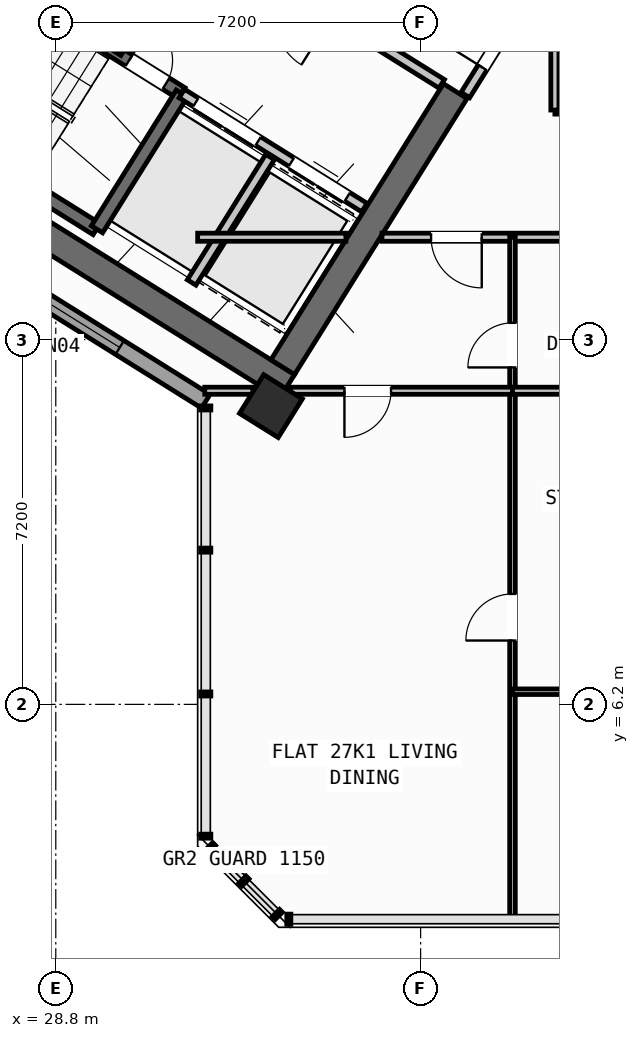
"""IFC4 building model, lengths in metres.
Left out: names, types, materials, properties, quantities, classifications, styles, units other than length and angle.
Written with IfcOpenShell. Run it as: python <this file> out.ifc"""

import sys

from ifc_helpers import new_model, si_unit, direction, frame, frame_2d, origin, origin_2d, place, context, subcontext, project, spatial, rectangle, hollow_rectangle, extrude, source, transform, mapped, element, fill, save


model = new_model("IFC4")
c1 = context("Model", 3, precision=1e-05, world=origin(), true_north=direction((0.0, 1.0)))
c2 = subcontext(c1, "Body", "Model", "MODEL_VIEW")
j1 = project(units=[si_unit("LENGTHUNIT", "METRE"), si_unit("PLANEANGLEUNIT", "RADIAN")], contexts=[c1])
p1 = place(None, origin())
s1 = spatial("IfcSite", under=j1, at=p1, CompositionType="ELEMENT")
p2 = place(p1, origin())
s2 = spatial("IfcBuilding", under=s1, at=p2, CompositionType="ELEMENT")
p3 = place(p2, frame((0.0, 0.0, 108.9)))
s3 = spatial("IfcBuildingStorey", under=s2, at=p3, CompositionType="ELEMENT", Elevation=108.9)
p4 = place(p3, frame((33.366, 12.477, 0.0), z_axis=(0.0, 0.0, 1.0), x_axis=(-0.848047359947, 0.529920442413, 0.0)))
e1 = element("IfcWall", 1, at=p4, inside=s3, PredefinedType="SHEAR", context=c2, shape_type="SweptSolid", body=[
    extrude(rectangle(XDim=13.14, YDim=0.55, at=frame_2d((6.57, 0.0))), origin(), (0.0, 0.0, 1.0), 3.35),
])
p5 = place(p3, frame((36.683, 18.304, 0.0), z_axis=(0.0, 0.0, 1.0), x_axis=(-0.529896466841, -0.848062341122, 0.0)))
e2 = element("IfcWall", 2, at=p5, inside=s3, PredefinedType="SHEAR", context=c2, shape_type="SweptSolid", body=[
    extrude(rectangle(XDim=6.425, YDim=0.55, at=frame_2d((3.212, 0.0))), origin(), (0.0, 0.0, 1.0), 3.35),
])
m1 = source(origin(), c2, "Body", "SweptSolid", [
    extrude(hollow_rectangle(XDim=0.9, YDim=0.9, WallThickness=0.036, at=origin_2d()), origin(), (0.0, 0.0, 1.0), 3.6),
])
p6 = place(p3, frame((33.046, 12.087, 0.0), z_axis=(0.0, 0.0, 1.0), x_axis=(-0.848048096156, 0.529919264233, 0.0)))
e3 = element("IfcColumn", 3, at=p6, inside=s3, PredefinedType="COLUMN", context=c2, shape_type="MappedRepresentation", body=[
    mapped(m1, transform((0.0, 0.0, 0.0), scale=1.0)),
])
p7 = place(p3, frame((31.76, 12.183, 0.0), z_axis=(0.0, 0.0, 1.0), x_axis=(-0.848047074256, 0.529920899612, 0.0)))
e4 = element("IfcWall", 4, at=p7, inside=s3, PredefinedType="STANDARD", context=c2, shape_type="SweptSolid", body=[
    extrude(rectangle(XDim=30.652, YDim=0.32, at=frame_2d((15.326, 0.0))), origin(), (0.0, 0.0, 1.0), 3.35),
])
p8 = place(p7, frame((15.153, 0.0, 0.0)))
e5 = element("IfcOpeningElement", 5, at=p8, cuts=e4, PredefinedType="OPENING", context=c2, shape_type="SweptSolid", body=[
    extrude(rectangle(XDim=1.2, YDim=2.15, at=frame_2d((0.6, 1.075))), frame((0.0, 0.17, 0.0), z_axis=(0.0, -1.0, 0.0), x_axis=(1.0, 0.0, 0.0)), (0.0, 0.0, 1.0), 0.34),
])
p9 = place(p7, frame((2.002, 0.0, 0.8)))
e6 = element("IfcOpeningElement", 6, at=p9, cuts=e4, PredefinedType="OPENING", context=c2, shape_type="SweptSolid", body=[
    extrude(rectangle(XDim=2.1, YDim=1.55, at=frame_2d((1.05, 0.775))), frame((0.0, 0.17, 0.0), z_axis=(0.0, -1.0, 0.0), x_axis=(1.0, 0.0, 0.0)), (0.0, 0.0, 1.0), 0.34),
])
p10 = place(p7, frame((7.206, 0.0, 0.8)))
e7 = element("IfcOpeningElement", 7, at=p10, cuts=e4, PredefinedType="OPENING", context=c2, shape_type="SweptSolid", body=[
    extrude(rectangle(XDim=2.1, YDim=1.55, at=frame_2d((1.05, 0.775))), frame((0.0, 0.17, 0.0), z_axis=(0.0, -1.0, 0.0), x_axis=(1.0, 0.0, 0.0)), (0.0, 0.0, 1.0), 0.34),
])
p11 = place(p7, frame((12.648, 0.0, 1.0)))
e8 = element("IfcOpeningElement", 8, at=p11, cuts=e4, PredefinedType="OPENING", context=c2, shape_type="SweptSolid", body=[
    extrude(rectangle(XDim=0.9, YDim=1.25, at=frame_2d((0.45, 0.625))), frame((0.0, 0.17, 0.0), z_axis=(0.0, -1.0, 0.0), x_axis=(1.0, 0.0, 0.0)), (0.0, 0.0, 1.0), 0.34),
])
p12 = place(p7, frame((19.59, 0.0, 0.95)))
e9 = element("IfcOpeningElement", 9, at=p12, cuts=e4, PredefinedType="OPENING", context=c2, shape_type="SweptSolid", body=[
    extrude(rectangle(XDim=1.2, YDim=1.4, at=frame_2d((0.6, 0.7))), frame((0.0, 0.17, 0.0), z_axis=(0.0, -1.0, 0.0), x_axis=(1.0, 0.0, 0.0)), (0.0, 0.0, 1.0), 0.34),
])
p13 = place(p7, frame((25.966, 0.0, 1.0)))
e10 = element("IfcOpeningElement", 10, at=p13, cuts=e4, PredefinedType="OPENING", context=c2, shape_type="SweptSolid", body=[
    extrude(rectangle(XDim=0.9, YDim=1.25, at=frame_2d((0.45, 0.625))), frame((0.0, 0.17, 0.0), z_axis=(0.0, -1.0, 0.0), x_axis=(1.0, 0.0, 0.0)), (0.0, 0.0, 1.0), 0.34),
])
p14 = place(p7, frame((28.871, 0.0, 1.0)))
e11 = element("IfcOpeningElement", 11, at=p14, cuts=e4, PredefinedType="OPENING", context=c2, shape_type="SweptSolid", body=[
    extrude(rectangle(XDim=0.9, YDim=1.25, at=frame_2d((0.45, 0.625))), frame((0.0, 0.17, 0.0), z_axis=(0.0, -1.0, 0.0), x_axis=(1.0, 0.0, 0.0)), (0.0, 0.0, 1.0), 0.34),
])
p15 = place(p3, frame((29.605, 15.581, 0.0), z_axis=(0.0, 0.0, 1.0), x_axis=(-0.848036911448, 0.529937163087, 0.0)))
e12 = element("IfcWall", 12, at=p15, inside=s3, PredefinedType="SHEAR", context=c2, shape_type="SweptSolid", body=[
    extrude(rectangle(XDim=7.46, YDim=0.26, at=frame_2d((3.73, 0.0))), origin(), (0.0, 0.0, 1.0), 3.35),
])
p16 = place(p3, frame((31.28, 18.261, 0.0), z_axis=(0.0, 0.0, 1.0), x_axis=(-0.848051618787, 0.529913626805, 0.0)))
e13 = element("IfcWall", 13, at=p16, inside=s3, PredefinedType="SHEAR", context=c2, shape_type="SweptSolid", body=[
    extrude(rectangle(XDim=7.46, YDim=0.26, at=frame_2d((3.73, 0.0))), origin(), (0.0, 0.0, 1.0), 3.35),
])
p17 = place(p16, frame((0.36, 0.0, 0.0)))
e14 = element("IfcOpeningElement", 14, at=p17, cuts=e13, PredefinedType="OPENING", context=c2, shape_type="SweptSolid", body=[
    extrude(rectangle(XDim=0.86, YDim=2.05, at=frame_2d((0.43, 1.025))), frame((0.0, 0.14, 0.0), z_axis=(0.0, -1.0, 0.0), x_axis=(1.0, 0.0, 0.0)), (0.0, 0.0, 1.0), 0.28),
])
p18 = place(p3, frame((31.288, 18.256, 0.0), z_axis=(0.0, 0.0, 1.0), x_axis=(-0.529943379326, -0.848033026897, 0.0)))
e15 = element("IfcWall", 15, at=p18, inside=s3, PredefinedType="SHEAR", context=c2, shape_type="SweptSolid", body=[
    extrude(rectangle(XDim=3.16, YDim=0.26, at=frame_2d((1.58, 0.0))), origin(), (0.0, 0.0, 1.0), 3.35),
])
p19 = place(p3, frame((34.891, 16.005, 0.0), z_axis=(0.0, 0.0, 1.0), x_axis=(-0.848062873452, 0.529895614884, 0.0)))
e16 = element("IfcWall", 16, at=p19, inside=s3, PredefinedType="STANDARD", context=c2, shape_type="SweptSolid", body=[
    extrude(rectangle(XDim=4.248, YDim=0.2, at=frame_2d((2.124, 0.0))), origin(), (0.0, 0.0, 1.0), 3.34),
])
p20 = place(p19, frame((0.398, 0.0, 0.0)))
e17 = element("IfcOpeningElement", 17, at=p20, cuts=e16, PredefinedType="OPENING", context=c2, shape_type="SweptSolid", body=[
    extrude(rectangle(XDim=1.3, YDim=2.2, at=frame_2d((0.65, 1.1))), frame((0.0, 0.11, 0.0), z_axis=(0.0, -1.0, 0.0), x_axis=(1.0, 0.0, 0.0)), (0.0, 0.0, 1.0), 0.22),
])
p21 = place(p19, frame((2.473, 0.0, 0.0)))
e18 = element("IfcOpeningElement", 18, at=p21, cuts=e16, PredefinedType="OPENING", context=c2, shape_type="SweptSolid", body=[
    extrude(rectangle(XDim=1.45, YDim=2.25, at=frame_2d((0.725, 1.125))), frame((0.0, 0.11, 0.0), z_axis=(0.0, -1.0, 0.0), x_axis=(1.0, 0.0, 0.0)), (0.0, 0.0, 1.0), 0.22),
])
p22 = place(p3, frame((36.417, 18.447, 0.0), z_axis=(0.0, 0.0, 1.0), x_axis=(-0.848064879198, 0.529892404805, 0.0)))
e19 = element("IfcWall", 19, at=p22, inside=s3, PredefinedType="STANDARD", context=c2, shape_type="SweptSolid", body=[
    extrude(rectangle(XDim=5.768, YDim=0.2, at=frame_2d((2.884, 0.0))), origin(), (0.0, 0.0, 1.0), 3.34),
])
p23 = place(p22, frame((2.548, 0.0, 0.0)))
e20 = element("IfcOpeningElement", 20, at=p23, cuts=e19, PredefinedType="OPENING", context=c2, shape_type="SweptSolid", body=[
    extrude(rectangle(XDim=1.15, YDim=2.1, at=frame_2d((0.575, 1.05))), frame((0.0, 0.11, 0.0), z_axis=(0.0, -1.0, 0.0), x_axis=(1.0, 0.0, 0.0)), (0.0, 0.0, 1.0), 0.22),
])
p24 = place(p3, frame((33.029, 17.003, 0.0), z_axis=(0.0, 0.0, 1.0), x_axis=(-0.529916267533, -0.848049968695, 0.0)))
e21 = element("IfcWall", 21, at=p24, inside=s3, PredefinedType="STANDARD", context=c2, shape_type="SweptSolid", body=[
    extrude(rectangle(XDim=2.92, YDim=0.2, at=frame_2d((1.46, 0.0))), origin(), (0.0, 0.0, 1.0), 3.34),
])
p25 = place(p3, frame((31.525, 21.504, 0.0), z_axis=(0.0, 0.0, 1.0), x_axis=(-0.529907497854, -0.848055448493, 0.0)))
e22 = element("IfcWall", 22, at=p25, inside=s3, PredefinedType="STANDARD", context=c2, shape_type="SweptSolid", body=[
    extrude(rectangle(XDim=2.88, YDim=0.2, at=frame_2d((1.44, 0.0))), origin(), (0.0, 0.0, 1.0), 3.34),
])
p26 = place(p3, frame((38.451, 20.737, 0.0), z_axis=(0.0, 0.0, 1.0), x_axis=(-0.529924799939, -0.848044637038, 0.0)))
e23 = element("IfcWall", 23, at=p26, inside=s3, PredefinedType="STANDARD", context=c2, shape_type="SweptSolid", body=[
    extrude(rectangle(XDim=2.96, YDim=0.2, at=frame_2d((1.48, 0.0))), origin(), (0.0, 0.0, 1.0), 3.34),
])
p27 = place(p26, frame((1.46, 0.0, 0.0)))
e24 = element("IfcOpeningElement", 24, at=p27, cuts=e23, PredefinedType="OPENING", context=c2, shape_type="SweptSolid", body=[
    extrude(rectangle(XDim=0.86, YDim=2.05, at=frame_2d((0.43, 1.025))), frame((0.0, 0.11, 0.0), z_axis=(0.0, -1.0, 0.0), x_axis=(1.0, 0.0, 0.0)), (0.0, 0.0, 1.0), 0.22),
])
p28 = place(p3, frame((31.6, 15.42, 0.0), z_axis=(0.0, 0.0, 1.0), x_axis=(1.0, 0.0, 0.0)))
e25 = element("IfcWall", 25, at=p28, inside=s3, PredefinedType="PARTITIONING", context=c2, shape_type="SweptSolid", body=[
    extrude(rectangle(XDim=2.925, YDim=0.16, at=frame_2d((1.462, 0.0))), origin(), (0.0, 0.0, 1.0), 3.34),
])
p29 = place(p3, frame((35.237, 15.42, 0.0), z_axis=(0.0, 0.0, 1.0), x_axis=(1.0, 0.0, 0.0)))
e26 = element("IfcWall", 26, at=p29, inside=s3, PredefinedType="PARTITIONING", context=c2, shape_type="SweptSolid", body=[
    extrude(rectangle(XDim=15.432, YDim=0.16, at=frame_2d((7.716, 0.0))), origin(), (0.0, 0.0, 1.0), 3.34),
])
p30 = place(p29, frame((0.969, 0.0, 0.0)))
e27 = element("IfcOpeningElement", 27, at=p30, cuts=e26, PredefinedType="OPENING", context=c2, shape_type="SweptSolid", body=[
    extrude(rectangle(XDim=1.0, YDim=2.1, at=frame_2d((0.5, 1.05))), frame((0.0, 0.09, 0.0), z_axis=(0.0, -1.0, 0.0), x_axis=(1.0, 0.0, 0.0)), (0.0, 0.0, 1.0), 0.18),
])
p31 = place(p29, frame((8.799, 0.0, 0.0)))
e28 = element("IfcOpeningElement", 28, at=p31, cuts=e26, PredefinedType="OPENING", context=c2, shape_type="SweptSolid", body=[
    extrude(rectangle(XDim=1.0, YDim=2.1, at=frame_2d((0.5, 1.05))), frame((0.0, 0.09, 0.0), z_axis=(0.0, -1.0, 0.0), x_axis=(1.0, 0.0, 0.0)), (0.0, 0.0, 1.0), 0.18),
])
p32 = place(p3, frame((38.65, 17.93, 0.0), z_axis=(0.0, 0.0, 1.0), x_axis=(1.0, 0.0, 0.0)))
e29 = element("IfcWall", 29, at=p32, inside=s3, PredefinedType="PARTITIONING", context=c2, shape_type="SweptSolid", body=[
    extrude(rectangle(XDim=9.95, YDim=0.16, at=frame_2d((4.975, 0.0))), origin(), (0.0, 0.0, 1.0), 3.34),
])
p33 = place(p32, frame((4.475, 0.0, 0.0)))
e30 = element("IfcOpeningElement", 30, at=p33, cuts=e29, PredefinedType="OPENING", context=c2, shape_type="SweptSolid", body=[
    extrude(rectangle(XDim=1.0, YDim=2.1, at=frame_2d((0.5, 1.05))), frame((0.0, 0.09, 0.0), z_axis=(0.0, -1.0, 0.0), x_axis=(1.0, 0.0, 0.0)), (0.0, 0.0, 1.0), 0.18),
])
p34 = place(p3, frame((38.65, 17.93, 0.0), z_axis=(0.0, 0.0, 1.0), x_axis=(0.0, 1.0, 0.0)))
e31 = element("IfcWall", 31, at=p34, inside=s3, PredefinedType="PARTITIONING", context=c2, shape_type="SweptSolid", body=[
    extrude(rectangle(XDim=2.951, YDim=0.16, at=frame_2d((1.476, 0.0))), origin(), (0.0, 0.0, 1.0), 3.34),
])
p35 = place(p3, frame((37.813, 1.96, 0.0), z_axis=(0.0, 0.0, 1.0), x_axis=(0.0, 1.0, 0.0)))
e32 = element("IfcWall", 32, at=p35, inside=s3, PredefinedType="PARTITIONING", context=c2, shape_type="SweptSolid", body=[
    extrude(rectangle(XDim=13.46, YDim=0.11, at=frame_2d((6.73, 0.0))), origin(), (0.0, 0.0, 1.0), 3.34),
])
p36 = place(p35, frame((5.5, 0.0, 0.0)))
e33 = element("IfcOpeningElement", 33, at=p36, cuts=e32, PredefinedType="OPENING", context=c2, shape_type="SweptSolid", body=[
    extrude(rectangle(XDim=0.92, YDim=2.08, at=frame_2d((0.46, 1.04))), frame((0.0, 0.065, 0.0), z_axis=(0.0, -1.0, 0.0), x_axis=(1.0, 0.0, 0.0)), (0.0, 0.0, 1.0), 0.13),
])
p37 = place(p35, frame((10.89, 0.0, 0.0)))
e34 = element("IfcOpeningElement", 34, at=p37, cuts=e32, PredefinedType="OPENING", context=c2, shape_type="SweptSolid", body=[
    extrude(rectangle(XDim=0.88, YDim=2.08, at=frame_2d((0.44, 1.04))), frame((0.0, 0.065, 0.0), z_axis=(0.0, -1.0, 0.0), x_axis=(1.0, 0.0, 0.0)), (0.0, 0.0, 1.0), 0.13),
])
p38 = place(p3, frame((31.74, 12.39, 0.0), z_axis=(0.0, 0.0, 1.0), x_axis=(1.0, 0.0, 0.0)))
e35 = element("IfcWall", 35, at=p38, inside=s3, PredefinedType="PLUMBINGWALL", context=c2, shape_type="SweptSolid", body=[
    extrude(rectangle(XDim=0.951, YDim=0.14, at=frame_2d((0.475, 0.0))), origin(), (0.0, 0.0, 1.0), 3.34),
])
p39 = place(p3, frame((33.433, 12.39, 0.0), z_axis=(0.0, 0.0, 1.0), x_axis=(1.0, 0.0, 0.0)))
e36 = element("IfcWall", 36, at=p39, inside=s3, PredefinedType="PLUMBINGWALL", context=c2, shape_type="SweptSolid", body=[
    extrude(rectangle(XDim=4.38, YDim=0.14, at=frame_2d((2.19, 0.0))), origin(), (0.0, 0.0, 1.0), 2.525),
])
p40 = place(p39, frame((1.064, 0.0, 0.0)))
e37 = element("IfcOpeningElement", 37, at=p40, cuts=e36, PredefinedType="OPENING", context=c2, shape_type="SweptSolid", body=[
    extrude(rectangle(XDim=0.92, YDim=2.08, at=frame_2d((0.46, 1.04))), frame((0.0, 0.08, 0.0), z_axis=(0.0, -1.0, 0.0), x_axis=(1.0, 0.0, 0.0)), (0.0, 0.0, 1.0), 0.16),
])
p41 = place(p3, frame((37.813, 12.39, 0.0), z_axis=(0.0, 0.0, 1.0), x_axis=(1.0, 0.0, 0.0)))
e38 = element("IfcWall", 38, at=p41, inside=s3, PredefinedType="PLUMBINGWALL", context=c2, shape_type="SweptSolid", body=[
    extrude(rectangle(XDim=4.137, YDim=0.14, at=frame_2d((2.068, 0.0))), origin(), (0.0, 0.0, 1.0), 2.525),
])
p42 = place(p3, frame((37.813, 6.45, 0.0), z_axis=(0.0, 0.0, 1.0), x_axis=(1.0, 0.0, 0.0)))
e39 = element("IfcWall", 39, at=p42, inside=s3, PredefinedType="PARTITIONING", context=c2, shape_type="SweptSolid", body=[
    extrude(rectangle(XDim=4.137, YDim=0.11, at=frame_2d((2.068, 0.0))), origin(), (0.0, 0.0, 1.0), 3.34),
])
p43 = place(p42, frame((1.608, 0.0, 0.0)))
e40 = element("IfcOpeningElement", 40, at=p43, cuts=e39, PredefinedType="OPENING", context=c2, shape_type="SweptSolid", body=[
    extrude(rectangle(XDim=0.92, YDim=2.08, at=frame_2d((0.46, 1.04))), frame((0.0, 0.065, 0.0), z_axis=(0.0, -1.0, 0.0), x_axis=(1.0, 0.0, 0.0)), (0.0, 0.0, 1.0), 0.13),
])
m2 = source(origin(), c2, "Body", "SweptSolid", [
    extrude(rectangle(XDim=2.1, YDim=1.55, at=frame_2d((1.05, 0.775))), frame((0.0, 0.03, 0.0), z_axis=(0.0, -1.0, 0.0), x_axis=(1.0, 0.0, 0.0)), (0.0, 0.0, 1.0), 0.06),
])
p44 = place(p9, origin())
e41 = element("IfcWindow", 41, at=p44, inside=s3, PartitioningType="SINGLE_PANEL", PredefinedType="WINDOW", context=c2, shape_type="MappedRepresentation", body=[
    mapped(m2, transform((0.0, 0.0, 0.0), scale=1.0)),
])
fill(e6, e41)
m3 = source(origin(), c2, "Body", "SweptSolid", [
    extrude(rectangle(XDim=0.86, YDim=2.05, at=frame_2d((0.43, 1.025))), frame((0.0, 0.025, 0.0), z_axis=(0.0, -1.0, 0.0), x_axis=(1.0, 0.0, 0.0)), (0.0, 0.0, 1.0), 0.05),
])
p45 = place(p17, frame((0.86, 0.0, 0.0), z_axis=(0.0, 0.0, 1.0), x_axis=(-1.0, 0.0, 0.0)))
e42 = element("IfcDoor", 42, at=p45, inside=s3, OperationType="SINGLE_SWING_LEFT", PredefinedType="DOOR", context=c2, shape_type="MappedRepresentation", body=[
    mapped(m3, transform((0.0, 0.0, 0.0), scale=1.0)),
])
fill(e14, e42)
m4 = source(origin(), c2, "Body", "SweptSolid", [
    extrude(rectangle(XDim=1.3, YDim=2.2, at=frame_2d((0.65, 1.1))), frame((0.0, 0.025, 0.0), z_axis=(0.0, -1.0, 0.0), x_axis=(1.0, 0.0, 0.0)), (0.0, 0.0, 1.0), 0.05),
])
p46 = place(p20, origin())
e43 = element("IfcDoor", 43, at=p46, inside=s3, OperationType="DOUBLE_DOOR_SLIDING", PredefinedType="DOOR", context=c2, shape_type="MappedRepresentation", body=[
    mapped(m4, transform((0.0, 0.0, 0.0), scale=1.0)),
])
fill(e17, e43)
m5 = source(origin(), c2, "Body", "SweptSolid", [
    extrude(rectangle(XDim=1.45, YDim=2.25, at=frame_2d((0.725, 1.125))), frame((0.0, 0.025, 0.0), z_axis=(0.0, -1.0, 0.0), x_axis=(1.0, 0.0, 0.0)), (0.0, 0.0, 1.0), 0.05),
])
p47 = place(p21, origin())
e44 = element("IfcDoor", 44, at=p47, inside=s3, OperationType="DOUBLE_DOOR_SLIDING", PredefinedType="DOOR", context=c2, shape_type="MappedRepresentation", body=[
    mapped(m5, transform((0.0, 0.0, 0.0), scale=1.0)),
])
fill(e18, e44)
p48 = place(p27, frame((0.86, 0.0, 0.0), z_axis=(0.0, 0.0, 1.0), x_axis=(-1.0, 0.0, 0.0)))
e45 = element("IfcDoor", 45, at=p48, inside=s3, OperationType="SINGLE_SWING_LEFT", PredefinedType="DOOR", context=c2, shape_type="MappedRepresentation", body=[
    mapped(m3, transform((0.0, 0.0, 0.0), scale=1.0)),
])
fill(e24, e45)
m6 = source(origin(), c2, "Body", "SweptSolid", [
    extrude(rectangle(XDim=0.92, YDim=2.08, at=frame_2d((0.46, 1.04))), frame((0.0, 0.025, 0.0), z_axis=(0.0, -1.0, 0.0), x_axis=(1.0, 0.0, 0.0)), (0.0, 0.0, 1.0), 0.05),
])
p49 = place(p36, origin())
e46 = element("IfcDoor", 46, at=p49, inside=s3, OperationType="SINGLE_SWING_LEFT", PredefinedType="DOOR", context=c2, shape_type="MappedRepresentation", body=[
    mapped(m6, transform((0.0, 0.0, 0.0), scale=1.0)),
])
fill(e33, e46)
m7 = source(origin(), c2, "Body", "SweptSolid", [
    extrude(rectangle(XDim=1.0, YDim=2.1, at=frame_2d((0.5, 1.05))), frame((0.0, 0.025, 0.0), z_axis=(0.0, -1.0, 0.0), x_axis=(1.0, 0.0, 0.0)), (0.0, 0.0, 1.0), 0.05),
])
p50 = place(p30, frame((1.0, 0.0, 0.0), z_axis=(0.0, 0.0, 1.0), x_axis=(-1.0, 0.0, 0.0)))
e47 = element("IfcDoor", 47, at=p50, inside=s3, OperationType="SINGLE_SWING_LEFT", PredefinedType="DOOR", context=c2, shape_type="MappedRepresentation", body=[
    mapped(m7, transform((0.0, 0.0, 0.0), scale=1.0)),
])
fill(e27, e47)
p51 = place(p40, frame((0.92, 0.0, 0.0), z_axis=(0.0, 0.0, 1.0), x_axis=(-1.0, 0.0, 0.0)))
e48 = element("IfcDoor", 48, at=p51, inside=s3, OperationType="SINGLE_SWING_RIGHT", PredefinedType="DOOR", context=c2, shape_type="MappedRepresentation", body=[
    mapped(m6, transform((0.0, 0.0, 0.0), scale=1.0)),
])
fill(e37, e48)
m8 = source(origin(), c2, "Body", "SweptSolid", [
    extrude(rectangle(XDim=0.88, YDim=2.08, at=frame_2d((0.44, 1.04))), frame((0.0, 0.025, 0.0), z_axis=(0.0, -1.0, 0.0), x_axis=(1.0, 0.0, 0.0)), (0.0, 0.0, 1.0), 0.05),
])
p52 = place(p37, origin())
e49 = element("IfcDoor", 49, at=p52, inside=s3, OperationType="SINGLE_SWING_LEFT", PredefinedType="DOOR", context=c2, shape_type="MappedRepresentation", body=[
    mapped(m8, transform((0.0, 0.0, 0.0), scale=1.0)),
])
fill(e34, e49)
save(model, sys.argv[1])
